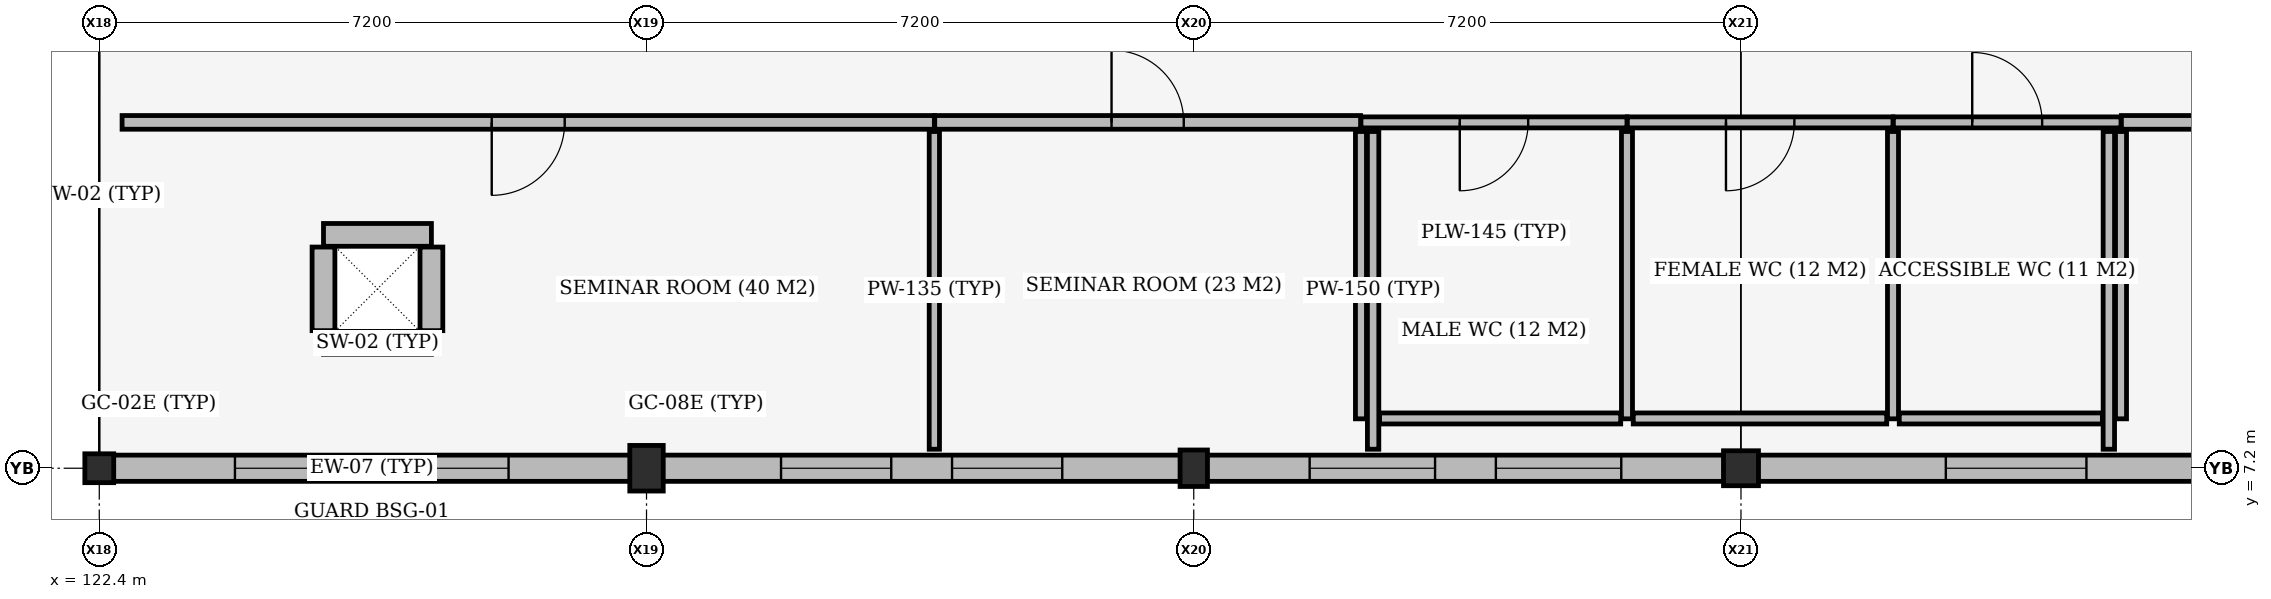
"""IFC4 building model, lengths in metres.
Left out: names, types, materials, properties, quantities, classifications, styles, units other than length and angle.
Written with IfcOpenShell. Run it as: python <this file> out.ifc"""

import sys

from ifc_helpers import new_model, si_unit, direction, frame, frame_2d, origin, origin_2d, place, context, subcontext, project, spatial, rectangle, extrude, element, fill, save


model = new_model("IFC4")
c1 = context("Model", 3, precision=1e-05, world=origin(), true_north=direction((0.0, 1.0)))
c2 = subcontext(c1, "Body", "Model", "MODEL_VIEW")
j1 = project(units=[si_unit("LENGTHUNIT", "METRE"), si_unit("PLANEANGLEUNIT", "RADIAN")], contexts=[c1])
p1 = place(None, origin())
s1 = spatial("IfcSite", under=j1, at=p1, CompositionType="ELEMENT")
p2 = place(p1, origin())
s2 = spatial("IfcBuilding", under=s1, at=p2, CompositionType="ELEMENT")
p3 = place(p2, frame((0.0, 0.0, 9.6)))
s3 = spatial("IfcBuildingStorey", under=s2, at=p3, CompositionType="ELEMENT", Elevation=9.6)
p4 = place(p3, frame((125.35, 8.85, 0.0), z_axis=(0.0, 0.0, 1.0), x_axis=(1.0, 0.0, 0.0)))
e1 = element("IfcWall", 1, at=p4, inside=s3, PredefinedType="SHEAR", context=c2, shape_type="SweptSolid", body=[
    extrude(rectangle(XDim=1.42, YDim=0.3, at=frame_2d((0.71, 0.0))), origin(), (0.0, 0.0, 1.0), 3.96),
])
p5 = place(p3, frame((126.77, 9.01, 0.0), z_axis=(0.0, 0.0, 1.0), x_axis=(0.0, 1.0, 0.0)))
e2 = element("IfcWall", 2, at=p5, inside=s3, PredefinedType="SHEAR", context=c2, shape_type="SweptSolid", body=[
    extrude(rectangle(XDim=1.1, YDim=0.3, at=frame_2d((0.55, 0.0))), origin(), (0.0, 0.0, 1.0), 3.96),
])
p6 = place(p3, frame((126.77, 10.27, 0.0), z_axis=(0.0, 0.0, 1.0), x_axis=(-1.0, 0.0, 0.0)))
e3 = element("IfcWall", 3, at=p6, inside=s3, PredefinedType="SHEAR", context=c2, shape_type="SweptSolid", body=[
    extrude(rectangle(XDim=1.42, YDim=0.3, at=frame_2d((0.71, 0.0))), origin(), (0.0, 0.0, 1.0), 3.96),
])
p7 = place(p3, frame((125.35, 10.11, 0.0), z_axis=(0.0, 0.0, 1.0), x_axis=(0.0, -1.0, 0.0)))
e4 = element("IfcWall", 4, at=p7, inside=s3, PredefinedType="SHEAR", context=c2, shape_type="SweptSolid", body=[
    extrude(rectangle(XDim=1.1, YDim=0.3, at=frame_2d((0.55, 0.0))), origin(), (0.0, 0.0, 1.0), 3.96),
])
p8 = place(p3, frame((122.4, 7.2, 0.0), z_axis=(0.0, 0.0, 1.0), x_axis=(1.0, 0.0, 0.0)))
e5 = element("IfcColumn", 5, at=p8, inside=s3, PredefinedType="COLUMN", context=c2, shape_type="SweptSolid", body=[
    extrude(rectangle(XDim=0.38, YDim=0.38, at=origin_2d()), origin(), (0.0, 0.0, 1.0), 3.96),
])
p9 = place(p3, frame((129.6, 7.2, 0.0), z_axis=(0.0, 0.0, 1.0), x_axis=(1.0, 0.0, 0.0)))
e6 = element("IfcColumn", 6, at=p9, inside=s3, PredefinedType="COLUMN", context=c2, shape_type="SweptSolid", body=[
    extrude(rectangle(XDim=0.44, YDim=0.6, at=origin_2d()), origin(), (0.0, 0.0, 1.0), 3.96),
])
p10 = place(p3, frame((136.8, 7.2, 0.0), z_axis=(0.0, 0.0, 1.0), x_axis=(1.0, 0.0, 0.0)))
e7 = element("IfcColumn", 7, at=p10, inside=s3, PredefinedType="COLUMN", context=c2, shape_type="SweptSolid", body=[
    extrude(rectangle(XDim=0.36, YDim=0.48, at=origin_2d()), origin(), (0.0, 0.0, 1.0), 3.96),
])
p11 = place(p3, frame((144.0, 7.2, 0.0), z_axis=(0.0, 0.0, 1.0), x_axis=(1.0, 0.0, 0.0)))
e8 = element("IfcColumn", 8, at=p11, inside=s3, PredefinedType="COLUMN", context=c2, shape_type="SweptSolid", body=[
    extrude(rectangle(XDim=0.46, YDim=0.46, at=origin_2d()), origin(), (0.0, 0.0, 1.0), 3.96),
])
p12 = place(p3, frame((129.388, 7.2, 0.0), z_axis=(0.0, 0.0, 1.0), x_axis=(-1.0, 0.0, 0.0)))
e9 = element("IfcWall", 9, at=p12, inside=s3, PredefinedType="STANDARD", context=c2, shape_type="SweptSolid", body=[
    extrude(rectangle(XDim=6.806, YDim=0.345, at=frame_2d((3.403, 0.0))), origin(), (0.0, 0.0, 1.0), 3.92),
])
p13 = place(p12, frame((1.603, 0.0, 0.8)))
e10 = element("IfcOpeningElement", 10, at=p13, cuts=e9, PredefinedType="OPENING", context=c2, shape_type="SweptSolid", body=[
    extrude(rectangle(XDim=1.4, YDim=2.6, at=frame_2d((0.7, 1.3))), frame((0.0, 0.182, 0.0), z_axis=(0.0, -1.0, 0.0), x_axis=(1.0, 0.0, 0.0)), (0.0, 0.0, 1.0), 0.365),
])
p14 = place(p12, frame((3.803, 0.0, 0.8)))
e11 = element("IfcOpeningElement", 11, at=p14, cuts=e9, PredefinedType="OPENING", context=c2, shape_type="SweptSolid", body=[
    extrude(rectangle(XDim=1.4, YDim=2.6, at=frame_2d((0.7, 1.3))), frame((0.0, 0.182, 0.0), z_axis=(0.0, -1.0, 0.0), x_axis=(1.0, 0.0, 0.0)), (0.0, 0.0, 1.0), 0.365),
])
p15 = place(p3, frame((136.628, 7.2, 0.0), z_axis=(0.0, 0.0, 1.0), x_axis=(-1.0, 0.0, 0.0)))
e12 = element("IfcWall", 12, at=p15, inside=s3, PredefinedType="STANDARD", context=c2, shape_type="SweptSolid", body=[
    extrude(rectangle(XDim=6.816, YDim=0.345, at=frame_2d((3.408, 0.0))), origin(), (0.0, 0.0, 1.0), 3.92),
])
p16 = place(p15, frame((1.558, 0.0, 0.9)))
e13 = element("IfcOpeningElement", 13, at=p16, cuts=e12, PredefinedType="OPENING", context=c2, shape_type="SweptSolid", body=[
    extrude(rectangle(XDim=1.45, YDim=2.35, at=frame_2d((0.725, 1.175))), frame((0.0, 0.182, 0.0), z_axis=(0.0, -1.0, 0.0), x_axis=(1.0, 0.0, 0.0)), (0.0, 0.0, 1.0), 0.365),
])
p17 = place(p15, frame((3.808, 0.0, 0.9)))
e14 = element("IfcOpeningElement", 14, at=p17, cuts=e12, PredefinedType="OPENING", context=c2, shape_type="SweptSolid", body=[
    extrude(rectangle(XDim=1.45, YDim=2.35, at=frame_2d((0.725, 1.175))), frame((0.0, 0.182, 0.0), z_axis=(0.0, -1.0, 0.0), x_axis=(1.0, 0.0, 0.0)), (0.0, 0.0, 1.0), 0.365),
])
p18 = place(p3, frame((143.778, 7.2, 0.0), z_axis=(0.0, 0.0, 1.0), x_axis=(-1.0, 0.0, 0.0)))
e15 = element("IfcWall", 15, at=p18, inside=s3, PredefinedType="STANDARD", context=c2, shape_type="SweptSolid", body=[
    extrude(rectangle(XDim=6.806, YDim=0.345, at=frame_2d((3.403, 0.0))), origin(), (0.0, 0.0, 1.0), 3.92),
])
p19 = place(p18, frame((1.353, 0.0, 0.9)))
e16 = element("IfcOpeningElement", 16, at=p19, cuts=e15, PredefinedType="OPENING", context=c2, shape_type="SweptSolid", body=[
    extrude(rectangle(XDim=1.65, YDim=2.35, at=frame_2d((0.825, 1.175))), frame((0.0, 0.182, 0.0), z_axis=(0.0, -1.0, 0.0), x_axis=(1.0, 0.0, 0.0)), (0.0, 0.0, 1.0), 0.365),
])
p20 = place(p18, frame((3.803, 0.0, 0.9)))
e17 = element("IfcOpeningElement", 17, at=p20, cuts=e15, PredefinedType="OPENING", context=c2, shape_type="SweptSolid", body=[
    extrude(rectangle(XDim=1.65, YDim=2.35, at=frame_2d((0.825, 1.175))), frame((0.0, 0.182, 0.0), z_axis=(0.0, -1.0, 0.0), x_axis=(1.0, 0.0, 0.0)), (0.0, 0.0, 1.0), 0.365),
])
p21 = place(p3, frame((151.018, 7.2, 0.0), z_axis=(0.0, 0.0, 1.0), x_axis=(-1.0, 0.0, 0.0)))
e18 = element("IfcWall", 18, at=p21, inside=s3, PredefinedType="STANDARD", context=c2, shape_type="SweptSolid", body=[
    extrude(rectangle(XDim=6.796, YDim=0.345, at=frame_2d((3.398, 0.0))), origin(), (0.0, 0.0, 1.0), 3.92),
])
p22 = place(p21, frame((2.473, 0.0, 0.9)))
e19 = element("IfcOpeningElement", 19, at=p22, cuts=e18, PredefinedType="OPENING", context=c2, shape_type="SweptSolid", body=[
    extrude(rectangle(XDim=1.85, YDim=2.35, at=frame_2d((0.925, 1.175))), frame((0.0, 0.182, 0.0), z_axis=(0.0, -1.0, 0.0), x_axis=(1.0, 0.0, 0.0)), (0.0, 0.0, 1.0), 0.365),
])
p23 = place(p3, frame((139.0, 11.75, 0.0), z_axis=(0.0, 0.0, 1.0), x_axis=(1.0, 0.0, 0.0)))
e20 = element("IfcWall", 20, at=p23, inside=s3, PredefinedType="PLUMBINGWALL", context=c2, shape_type="SweptSolid", body=[
    extrude(rectangle(XDim=3.5, YDim=0.145, at=frame_2d((1.75, 0.0))), origin(), (0.0, 0.0, 1.0), 3.92),
])
p24 = place(p23, frame((1.3, 0.0, 0.0)))
e21 = element("IfcOpeningElement", 21, at=p24, cuts=e20, PredefinedType="OPENING", context=c2, shape_type="SweptSolid", body=[
    extrude(rectangle(XDim=0.9, YDim=2.1, at=frame_2d((0.45, 1.05))), frame((0.0, 0.083, 0.0), z_axis=(0.0, -1.0, 0.0), x_axis=(1.0, 0.0, 0.0)), (0.0, 0.0, 1.0), 0.165),
])
for number, where, z_axis, x_axis in (
    (22, (139.0, 7.85, 0.0), (0.0, 0.0, 1.0), (0.0, 1.0, 0.0)),
    (23, (142.5, 7.85, 0.0), (0.0, 0.0, 1.0), (0.0, 1.0, 0.0)),
):
    element("IfcWall", number, at=place(p3, frame(where, z_axis=z_axis, x_axis=x_axis)), inside=s3, PredefinedType="PLUMBINGWALL", context=c2, shape_type="SweptSolid", body=[
        extrude(rectangle(XDim=3.78, YDim=0.145, at=frame_2d((1.89, 0.0))), origin(), (0.0, 0.0, 1.0), 3.92),
    ])
p25 = place(p3, frame((142.505, 11.75, 0.0), z_axis=(0.0, 0.0, 1.0), x_axis=(1.0, 0.0, 0.0)))
e24 = element("IfcWall", 24, at=p25, inside=s3, PredefinedType="PLUMBINGWALL", context=c2, shape_type="SweptSolid", body=[
    extrude(rectangle(XDim=3.495, YDim=0.145, at=frame_2d((1.748, 0.0))), origin(), (0.0, 0.0, 1.0), 3.92),
])
p26 = place(p25, frame((1.298, 0.0, 0.0)))
e25 = element("IfcOpeningElement", 25, at=p26, cuts=e24, PredefinedType="OPENING", context=c2, shape_type="SweptSolid", body=[
    extrude(rectangle(XDim=0.9, YDim=2.1, at=frame_2d((0.45, 1.05))), frame((0.0, 0.083, 0.0), z_axis=(0.0, -1.0, 0.0), x_axis=(1.0, 0.0, 0.0)), (0.0, 0.0, 1.0), 0.165),
])
p27 = place(p3, frame((146.0, 7.85, 0.0), z_axis=(0.0, 0.0, 1.0), x_axis=(0.0, 1.0, 0.0)))
e26 = element("IfcWall", 26, at=p27, inside=s3, PredefinedType="PLUMBINGWALL", context=c2, shape_type="SweptSolid", body=[
    extrude(rectangle(XDim=3.78, YDim=0.145, at=frame_2d((1.89, 0.0))), origin(), (0.0, 0.0, 1.0), 3.92),
])
p28 = place(p3, frame((146.005, 11.75, 0.0), z_axis=(0.0, 0.0, 1.0), x_axis=(1.0, 0.0, 0.0)))
e27 = element("IfcWall", 27, at=p28, inside=s3, PredefinedType="PLUMBINGWALL", context=c2, shape_type="SweptSolid", body=[
    extrude(rectangle(XDim=2.995, YDim=0.145, at=frame_2d((1.498, 0.0))), origin(), (0.0, 0.0, 1.0), 3.92),
])
p29 = place(p28, frame((1.038, 0.0, 0.0)))
e28 = element("IfcOpeningElement", 28, at=p29, cuts=e27, PredefinedType="OPENING", context=c2, shape_type="SweptSolid", body=[
    extrude(rectangle(XDim=0.92, YDim=2.1, at=frame_2d((0.46, 1.05))), frame((0.0, 0.083, 0.0), z_axis=(0.0, -1.0, 0.0), x_axis=(1.0, 0.0, 0.0)), (0.0, 0.0, 1.0), 0.165),
])
p30 = place(p3, frame((149.0, 7.85, 0.0), z_axis=(0.0, 0.0, 1.0), x_axis=(0.0, 1.0, 0.0)))
e29 = element("IfcWall", 29, at=p30, inside=s3, PredefinedType="PLUMBINGWALL", context=c2, shape_type="SweptSolid", body=[
    extrude(rectangle(XDim=3.78, YDim=0.145, at=frame_2d((1.89, 0.0))), origin(), (0.0, 0.0, 1.0), 3.92),
])
p31 = place(p3, frame((122.7, 11.75, 0.0), z_axis=(0.0, 0.0, 1.0), x_axis=(1.0, 0.0, 0.0)))
e30 = element("IfcWall", 30, at=p31, inside=s3, PredefinedType="PARTITIONING", context=c2, shape_type="SweptSolid", body=[
    extrude(rectangle(XDim=10.687, YDim=0.18, at=frame_2d((5.344, 0.0))), origin(), (0.0, 0.0, 1.0), 3.92),
])
p32 = place(p31, frame((4.864, 0.0, 0.0)))
e31 = element("IfcOpeningElement", 31, at=p32, cuts=e30, PredefinedType="OPENING", context=c2, shape_type="SweptSolid", body=[
    extrude(rectangle(XDim=0.96, YDim=2.15, at=frame_2d((0.48, 1.075))), frame((0.0, 0.1, 0.0), z_axis=(0.0, -1.0, 0.0), x_axis=(1.0, 0.0, 0.0)), (0.0, 0.0, 1.0), 0.2),
])
p33 = place(p3, frame((133.387, 7.45, 0.0), z_axis=(0.0, 0.0, 1.0), x_axis=(0.0, 1.0, 0.0)))
e32 = element("IfcWall", 32, at=p33, inside=s3, PredefinedType="PARTITIONING", context=c2, shape_type="SweptSolid", body=[
    extrude(rectangle(XDim=4.18, YDim=0.135, at=frame_2d((2.09, 0.0))), origin(), (0.0, 0.0, 1.0), 3.92),
])
p34 = place(p3, frame((133.392, 11.75, 0.0), z_axis=(0.0, 0.0, 1.0), x_axis=(1.0, 0.0, 0.0)))
e33 = element("IfcWall", 33, at=p34, inside=s3, PredefinedType="PARTITIONING", context=c2, shape_type="SweptSolid", body=[
    extrude(rectangle(XDim=5.603, YDim=0.18, at=frame_2d((2.802, 0.0))), origin(), (0.0, 0.0, 1.0), 3.92),
])
p35 = place(p34, frame((2.326, 0.0, 0.0)))
e34 = element("IfcOpeningElement", 34, at=p35, cuts=e33, PredefinedType="OPENING", context=c2, shape_type="SweptSolid", body=[
    extrude(rectangle(XDim=0.95, YDim=2.15, at=frame_2d((0.475, 1.075))), frame((0.0, 0.1, 0.0), z_axis=(0.0, -1.0, 0.0), x_axis=(1.0, 0.0, 0.0)), (0.0, 0.0, 1.0), 0.2),
])
p36 = place(p3, frame((139.16, 7.45, 0.0), z_axis=(0.0, 0.0, 1.0), x_axis=(0.0, 1.0, 0.0)))
e35 = element("IfcWall", 35, at=p36, inside=s3, PredefinedType="PARTITIONING", context=c2, shape_type="SweptSolid", body=[
    extrude(rectangle(XDim=4.18, YDim=0.15, at=frame_2d((2.09, 0.0))), origin(), (0.0, 0.0, 1.0), 3.92),
])
p37 = place(p3, frame((149.005, 11.75, 0.0), z_axis=(0.0, 0.0, 1.0), x_axis=(1.0, 0.0, 0.0)))
e36 = element("IfcWall", 36, at=p37, inside=s3, PredefinedType="PARTITIONING", context=c2, shape_type="SweptSolid", body=[
    extrude(rectangle(XDim=12.809, YDim=0.18, at=frame_2d((6.405, 0.0))), origin(), (0.0, 0.0, 1.0), 3.92),
])
p38 = place(p37, frame((5.925, 0.0, 0.0)))
e37 = element("IfcOpeningElement", 37, at=p38, cuts=e36, PredefinedType="OPENING", context=c2, shape_type="SweptSolid", body=[
    extrude(rectangle(XDim=0.96, YDim=2.15, at=frame_2d((0.48, 1.075))), frame((0.0, 0.1, 0.0), z_axis=(0.0, -1.0, 0.0), x_axis=(1.0, 0.0, 0.0)), (0.0, 0.0, 1.0), 0.2),
])
p39 = place(p3, frame((148.84, 7.45, 0.0), z_axis=(0.0, 0.0, 1.0), x_axis=(0.0, 1.0, 0.0)))
e38 = element("IfcWall", 38, at=p39, inside=s3, PredefinedType="PARTITIONING", context=c2, shape_type="SweptSolid", body=[
    extrude(rectangle(XDim=4.18, YDim=0.15, at=frame_2d((2.09, 0.0))), origin(), (0.0, 0.0, 1.0), 3.92),
])
p40 = place(p3, frame((139.245, 7.855, 0.0), z_axis=(0.0, 0.0, 1.0), x_axis=(1.0, 0.0, 0.0)))
e39 = element("IfcWall", 39, at=p40, inside=s3, PredefinedType="PLUMBINGWALL", context=c2, shape_type="SweptSolid", body=[
    extrude(rectangle(XDim=3.172, YDim=0.145, at=frame_2d((1.586, 0.0))), origin(), (0.0, 0.0, 1.0), 3.92),
])
p41 = place(p3, frame((142.583, 7.855, 0.0), z_axis=(0.0, 0.0, 1.0), x_axis=(1.0, 0.0, 0.0)))
e40 = element("IfcWall", 40, at=p41, inside=s3, PredefinedType="PLUMBINGWALL", context=c2, shape_type="SweptSolid", body=[
    extrude(rectangle(XDim=3.335, YDim=0.145, at=frame_2d((1.667, 0.0))), origin(), (0.0, 0.0, 1.0), 3.92),
])
p42 = place(p3, frame((146.083, 7.855, 0.0), z_axis=(0.0, 0.0, 1.0), x_axis=(1.0, 0.0, 0.0)))
e41 = element("IfcWall", 41, at=p42, inside=s3, PredefinedType="PLUMBINGWALL", context=c2, shape_type="SweptSolid", body=[
    extrude(rectangle(XDim=2.672, YDim=0.145, at=frame_2d((1.336, 0.0))), origin(), (0.0, 0.0, 1.0), 3.92),
])
p43 = place(p13, origin())
e42 = element("IfcWindow", 42, at=p43, inside=s3, PartitioningType="DOUBLE_PANEL_VERTICAL", PredefinedType="WINDOW", context=c2, shape_type="SweptSolid", body=[
    extrude(rectangle(XDim=1.4, YDim=2.6, at=frame_2d((0.7, 1.3))), frame((0.0, 0.03, 0.0), z_axis=(0.0, -1.0, 0.0), x_axis=(1.0, 0.0, 0.0)), (0.0, 0.0, 1.0), 0.06),
])
fill(e10, e42)
p44 = place(p14, origin())
e43 = element("IfcWindow", 43, at=p44, inside=s3, PartitioningType="DOUBLE_PANEL_VERTICAL", PredefinedType="WINDOW", context=c2, shape_type="SweptSolid", body=[
    extrude(rectangle(XDim=1.4, YDim=2.6, at=frame_2d((0.7, 1.3))), frame((0.0, 0.03, 0.0), z_axis=(0.0, -1.0, 0.0), x_axis=(1.0, 0.0, 0.0)), (0.0, 0.0, 1.0), 0.06),
])
fill(e11, e43)
p45 = place(p16, origin())
e44 = element("IfcWindow", 44, at=p45, inside=s3, PartitioningType="DOUBLE_PANEL_VERTICAL", PredefinedType="WINDOW", context=c2, shape_type="SweptSolid", body=[
    extrude(rectangle(XDim=1.45, YDim=2.35, at=frame_2d((0.725, 1.175))), frame((0.0, 0.03, 0.0), z_axis=(0.0, -1.0, 0.0), x_axis=(1.0, 0.0, 0.0)), (0.0, 0.0, 1.0), 0.06),
])
fill(e13, e44)
p46 = place(p17, origin())
e45 = element("IfcWindow", 45, at=p46, inside=s3, PartitioningType="DOUBLE_PANEL_VERTICAL", PredefinedType="WINDOW", context=c2, shape_type="SweptSolid", body=[
    extrude(rectangle(XDim=1.45, YDim=2.35, at=frame_2d((0.725, 1.175))), frame((0.0, 0.03, 0.0), z_axis=(0.0, -1.0, 0.0), x_axis=(1.0, 0.0, 0.0)), (0.0, 0.0, 1.0), 0.06),
])
fill(e14, e45)
p47 = place(p19, origin())
e46 = element("IfcWindow", 46, at=p47, inside=s3, PartitioningType="DOUBLE_PANEL_VERTICAL", PredefinedType="WINDOW", context=c2, shape_type="SweptSolid", body=[
    extrude(rectangle(XDim=1.65, YDim=2.35, at=frame_2d((0.825, 1.175))), frame((0.0, 0.03, 0.0), z_axis=(0.0, -1.0, 0.0), x_axis=(1.0, 0.0, 0.0)), (0.0, 0.0, 1.0), 0.06),
])
fill(e16, e46)
p48 = place(p20, origin())
e47 = element("IfcWindow", 47, at=p48, inside=s3, PartitioningType="DOUBLE_PANEL_VERTICAL", PredefinedType="WINDOW", context=c2, shape_type="SweptSolid", body=[
    extrude(rectangle(XDim=1.65, YDim=2.35, at=frame_2d((0.825, 1.175))), frame((0.0, 0.03, 0.0), z_axis=(0.0, -1.0, 0.0), x_axis=(1.0, 0.0, 0.0)), (0.0, 0.0, 1.0), 0.06),
])
fill(e17, e47)
p49 = place(p22, origin())
e48 = element("IfcWindow", 48, at=p49, inside=s3, PartitioningType="DOUBLE_PANEL_VERTICAL", PredefinedType="WINDOW", context=c2, shape_type="SweptSolid", body=[
    extrude(rectangle(XDim=1.85, YDim=2.35, at=frame_2d((0.925, 1.175))), frame((0.0, 0.03, 0.0), z_axis=(0.0, -1.0, 0.0), x_axis=(1.0, 0.0, 0.0)), (0.0, 0.0, 1.0), 0.06),
])
fill(e19, e48)
p50 = place(p24, origin())
e49 = element("IfcDoor", 49, at=p50, inside=s3, OperationType="SINGLE_SWING_RIGHT", PredefinedType="DOOR", context=c2, shape_type="SweptSolid", body=[
    extrude(rectangle(XDim=0.9, YDim=2.1, at=frame_2d((0.45, 1.05))), frame((0.0, 0.025, 0.0), z_axis=(0.0, -1.0, 0.0), x_axis=(1.0, 0.0, 0.0)), (0.0, 0.0, 1.0), 0.05),
])
fill(e21, e49)
p51 = place(p26, origin())
e50 = element("IfcDoor", 50, at=p51, inside=s3, OperationType="SINGLE_SWING_RIGHT", PredefinedType="DOOR", context=c2, shape_type="SweptSolid", body=[
    extrude(rectangle(XDim=0.9, YDim=2.1, at=frame_2d((0.45, 1.05))), frame((0.0, 0.025, 0.0), z_axis=(0.0, -1.0, 0.0), x_axis=(1.0, 0.0, 0.0)), (0.0, 0.0, 1.0), 0.05),
])
fill(e25, e50)
p52 = place(p29, origin())
e51 = element("IfcDoor", 51, at=p52, inside=s3, OperationType="SINGLE_SWING_LEFT", PredefinedType="DOOR", context=c2, shape_type="SweptSolid", body=[
    extrude(rectangle(XDim=0.92, YDim=2.1, at=frame_2d((0.46, 1.05))), frame((0.0, 0.025, 0.0), z_axis=(0.0, -1.0, 0.0), x_axis=(1.0, 0.0, 0.0)), (0.0, 0.0, 1.0), 0.05),
])
fill(e28, e51)
p53 = place(p32, origin())
e52 = element("IfcDoor", 52, at=p53, inside=s3, OperationType="SINGLE_SWING_RIGHT", PredefinedType="DOOR", context=c2, shape_type="SweptSolid", body=[
    extrude(rectangle(XDim=0.96, YDim=2.15, at=frame_2d((0.48, 1.075))), frame((0.0, 0.025, 0.0), z_axis=(0.0, -1.0, 0.0), x_axis=(1.0, 0.0, 0.0)), (0.0, 0.0, 1.0), 0.05),
])
fill(e31, e52)
p54 = place(p35, origin())
e53 = element("IfcDoor", 53, at=p54, inside=s3, OperationType="SINGLE_SWING_LEFT", PredefinedType="DOOR", context=c2, shape_type="SweptSolid", body=[
    extrude(rectangle(XDim=0.95, YDim=2.15, at=frame_2d((0.475, 1.075))), frame((0.0, 0.025, 0.0), z_axis=(0.0, -1.0, 0.0), x_axis=(1.0, 0.0, 0.0)), (0.0, 0.0, 1.0), 0.05),
])
fill(e34, e53)
save(model, sys.argv[1])
